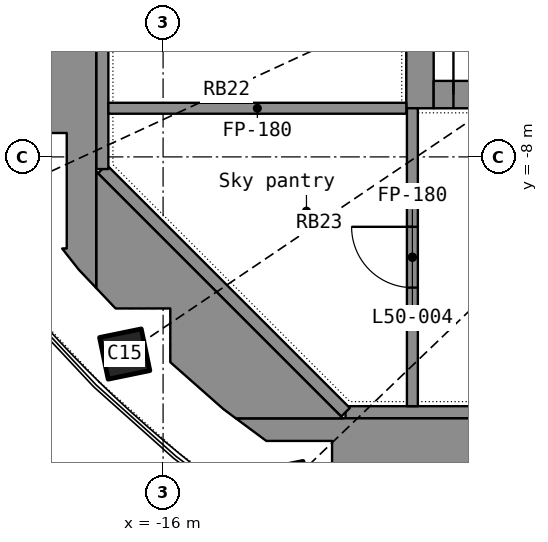
"""IFC4 building model, lengths in metres.
Left out: names, types, materials, properties, quantities, classifications, styles, units other than length and angle.
Written with IfcOpenShell. Run it as: python <this file> out.ifc"""

import sys

from ifc_helpers import new_model, si_unit, direction, frame, frame_2d, origin, origin_2d, place, context, subcontext, project, spatial, polyline, rectangle, hollow_rectangle, outline, extrude, element, fill, save


model = new_model("IFC4")
c1 = context("Model", 3, precision=1e-05, world=origin(), true_north=direction((0.0, 1.0)))
c2 = subcontext(c1, "Body", "Model", "MODEL_VIEW")
j1 = project(units=[si_unit("LENGTHUNIT", "METRE"), si_unit("PLANEANGLEUNIT", "RADIAN")], contexts=[c1])
p1 = place(None, origin())
s1 = spatial("IfcSite", under=j1, at=p1, CompositionType="ELEMENT")
p2 = place(p1, origin())
s2 = spatial("IfcBuilding", under=s1, at=p2, CompositionType="ELEMENT")
p3 = place(p2, frame((0.0, 0.0, 205.2)))
s3 = spatial("IfcBuildingStorey", under=s2, at=p3, CompositionType="ELEMENT", Elevation=205.2)
p4 = place(p3, frame((-18.535, -8.557, 0.0), z_axis=(0.029972624, 0.014178469, 0.999450155), x_axis=(-0.583640912, 0.811989828, 0.005983767)))
e1 = element("IfcColumn", 1, at=p4, inside=s3, PredefinedType="COLUMN", context=c2, shape_type="SweptSolid", body=[
    extrude(hollow_rectangle(XDim=1.1, YDim=1.1, WallThickness=0.032, at=origin_2d()), origin(), (0.0, 0.0, 1.0), 7.404),
])
p5 = place(p3, frame((-16.631, -11.243, 0.0), z_axis=(0.026511305, 0.018201791, 0.999482789), x_axis=(-0.720516136, 0.693407857, 0.006483911)))
e2 = element("IfcColumn", 2, at=p5, inside=s3, PredefinedType="COLUMN", context=c2, shape_type="SweptSolid", body=[
    extrude(hollow_rectangle(XDim=0.7, YDim=0.7, WallThickness=0.025, at=origin_2d()), origin(), (0.0, 0.0, 1.0), 7.404),
])
p6 = place(p3, frame((-13.971, -13.421, 0.0), z_axis=(0.022258382, 0.021697801, 0.999516768), x_axis=(-0.828160065, 0.560456529, 0.006275862)))
e3 = element("IfcColumn", 3, at=p6, inside=s3, PredefinedType="COLUMN", context=c2, shape_type="SweptSolid", body=[
    extrude(hollow_rectangle(XDim=0.7, YDim=0.7, WallThickness=0.025, at=origin_2d()), origin(), (0.0, 0.0, 1.0), 7.404),
])
p7 = place(p3, frame((13.0, -12.2, 0.08), z_axis=(0.0, 0.0, 1.0), x_axis=(-1.0, 0.0, 0.0)))
e4 = element("IfcWall", 4, at=p7, inside=s3, PredefinedType="STANDARD", context=c2, shape_type="SweptSolid", body=[
    extrude(rectangle(XDim=26.0, YDim=0.2, at=frame_2d((13.0, 0.0))), origin(), (0.0, 0.0, 1.0), 7.12),
])
p8 = place(p7, frame((7.1, 0.0, 0.0)))
e5 = element("IfcOpeningElement", 5, at=p8, cuts=e4, PredefinedType="OPENING", context=c2, shape_type="SweptSolid", body=[
    extrude(rectangle(XDim=1.8, YDim=2.4, at=frame_2d((0.9, 1.2))), frame((0.0, 0.11, 0.0), z_axis=(0.0, -1.0, 0.0), x_axis=(1.0, 0.0, 0.0)), (0.0, 0.0, 1.0), 0.22),
])
p9 = place(p7, frame((17.1, 0.0, 0.0)))
e6 = element("IfcOpeningElement", 6, at=p9, cuts=e4, PredefinedType="OPENING", context=c2, shape_type="SweptSolid", body=[
    extrude(rectangle(XDim=1.8, YDim=2.4, at=frame_2d((0.9, 1.2))), frame((0.0, 0.11, 0.0), z_axis=(0.0, -1.0, 0.0), x_axis=(1.0, 0.0, 0.0)), (0.0, 0.0, 1.0), 0.22),
])
p10 = place(p7, frame((3.3, 0.0, 0.9)))
e7 = element("IfcOpeningElement", 7, at=p10, cuts=e4, PredefinedType="OPENING", context=c2, shape_type="SweptSolid", body=[
    extrude(rectangle(XDim=2.4, YDim=1.5, at=frame_2d((1.2, 0.75))), frame((0.0, 0.11, 0.0), z_axis=(0.0, -1.0, 0.0), x_axis=(1.0, 0.0, 0.0)), (0.0, 0.0, 1.0), 0.22),
])
p11 = place(p7, frame((11.8, 0.0, 0.9)))
e8 = element("IfcOpeningElement", 8, at=p11, cuts=e4, PredefinedType="OPENING", context=c2, shape_type="SweptSolid", body=[
    extrude(rectangle(XDim=2.4, YDim=1.5, at=frame_2d((1.2, 0.75))), frame((0.0, 0.11, 0.0), z_axis=(0.0, -1.0, 0.0), x_axis=(1.0, 0.0, 0.0)), (0.0, 0.0, 1.0), 0.22),
])
p12 = place(p7, frame((20.3, 0.0, 0.9)))
e9 = element("IfcOpeningElement", 9, at=p12, cuts=e4, PredefinedType="OPENING", context=c2, shape_type="SweptSolid", body=[
    extrude(rectangle(XDim=2.4, YDim=1.5, at=frame_2d((1.2, 0.75))), frame((0.0, 0.11, 0.0), z_axis=(0.0, -1.0, 0.0), x_axis=(1.0, 0.0, 0.0)), (0.0, 0.0, 1.0), 0.22),
])
p13 = place(p7, frame((6.5, 0.0, 3.2)))
e10 = element("IfcOpeningElement", 10, at=p13, cuts=e4, PredefinedType="OPENING", context=c2, shape_type="SweptSolid", body=[
    extrude(rectangle(XDim=3.0, YDim=1.0, at=frame_2d((1.5, 0.5))), frame((0.0, 0.11, 0.0), z_axis=(0.0, -1.0, 0.0), x_axis=(1.0, 0.0, 0.0)), (0.0, 0.0, 1.0), 0.22),
])
p14 = place(p7, frame((16.5, 0.0, 3.2)))
e11 = element("IfcOpeningElement", 11, at=p14, cuts=e4, PredefinedType="OPENING", context=c2, shape_type="SweptSolid", body=[
    extrude(rectangle(XDim=3.0, YDim=1.0, at=frame_2d((1.5, 0.5))), frame((0.0, 0.11, 0.0), z_axis=(0.0, -1.0, 0.0), x_axis=(1.0, 0.0, 0.0)), (0.0, 0.0, 1.0), 0.22),
])
p15 = place(p3, frame((-13.0, -12.2, 0.08), z_axis=(0.0, 0.0, 1.0), x_axis=(-0.707106781, 0.707106781, 0.0)))
e12 = element("IfcWall", 12, at=p15, inside=s3, PredefinedType="STANDARD", context=c2, shape_type="SweptSolid", body=[
    extrude(rectangle(XDim=5.657, YDim=0.2, at=frame_2d((2.828, 0.0))), origin(), (0.0, 0.0, 1.0), 7.12),
])
p16 = place(p3, frame((-17.0, -8.2, 0.08), z_axis=(0.0, 0.0, 1.0), x_axis=(0.0, 1.0, 0.0)))
e13 = element("IfcWall", 13, at=p16, inside=s3, PredefinedType="STANDARD", context=c2, shape_type="SweptSolid", body=[
    extrude(rectangle(XDim=16.4, YDim=0.2, at=frame_2d((8.2, 0.0))), origin(), (0.0, 0.0, 1.0), 7.12),
])
p17 = place(p16, frame((7.3, 0.0, 0.0)))
e14 = element("IfcOpeningElement", 14, at=p17, cuts=e13, PredefinedType="OPENING", context=c2, shape_type="SweptSolid", body=[
    extrude(rectangle(XDim=1.8, YDim=2.4, at=frame_2d((0.9, 1.2))), frame((0.0, 0.11, 0.0), z_axis=(0.0, -1.0, 0.0), x_axis=(1.0, 0.0, 0.0)), (0.0, 0.0, 1.0), 0.22),
])
p18 = place(p16, frame((3.4, 0.0, 0.1)))
e15 = element("IfcOpeningElement", 15, at=p18, cuts=e13, PredefinedType="OPENING", context=c2, shape_type="SweptSolid", body=[
    extrude(rectangle(XDim=1.2, YDim=2.2, at=frame_2d((0.6, 1.1))), frame((0.0, 0.11, 0.0), z_axis=(0.0, -1.0, 0.0), x_axis=(1.0, 0.0, 0.0)), (0.0, 0.0, 1.0), 0.22),
])
p19 = place(p16, frame((11.8, 0.0, 0.1)))
e16 = element("IfcOpeningElement", 16, at=p19, cuts=e13, PredefinedType="OPENING", context=c2, shape_type="SweptSolid", body=[
    extrude(rectangle(XDim=1.2, YDim=2.2, at=frame_2d((0.6, 1.1))), frame((0.0, 0.11, 0.0), z_axis=(0.0, -1.0, 0.0), x_axis=(1.0, 0.0, 0.0)), (0.0, 0.0, 1.0), 0.22),
])
p20 = place(p3, frame((0.0, 0.0, -0.4)))
e17 = element("IfcWall", 17, at=p20, inside=s3, PredefinedType="ELEMENTEDWALL", context=c2, shape_type="SweptSolid", body=[
    extrude(outline(polyline([(-8.97, -15.569), (-8.196, -15.829), (-8.196, -15.756), (-6.696, -15.756), (-6.696, -16.286), (-5.9, -16.49), (-5.9, -12.3), (-13.042, -12.3), (-14.803, -12.3), (-14.302, -12.671), (-13.221, -12.671), (-13.221, -13.422), (-12.175, -14.072), (-11.7, -14.317), (-11.7, -13.974), (-9.8, -13.974), (-9.8, -15.22), (-8.97, -15.569)])), origin(), (0.0, 0.0, 1.0), 1.58),
])
p21 = place(p3, frame((0.0, 0.0, -0.4)))
e18 = element("IfcWall", 18, at=p21, inside=s3, PredefinedType="ELEMENTEDWALL", context=c2, shape_type="SweptSolid", body=[
    extrude(outline(polyline([(-14.803, -12.3), (-13.042, -12.3), (-17.1, -8.241), (-17.1, -10.156), (-16.781, -10.493), (-15.881, -10.493), (-15.881, -11.377), (-15.009, -12.147), (-14.803, -12.3)])), origin(), (0.0, 0.0, 1.0), 1.58),
])
p22 = place(p3, frame((0.0, 0.0, -0.4)))
e19 = element("IfcWall", 19, at=p22, inside=s3, PredefinedType="ELEMENTEDWALL", context=c2, shape_type="SweptSolid", body=[
    extrude(outline(polyline([(-17.1, -10.156), (-17.1, -8.241), (-17.1, -0.9), (-20.39, -0.9), (-20.39, -0.95), (-21.175, -0.95), (-21.145, -1.497), (-21.019, -2.273), (-20.567, -2.273), (-20.567, -3.773), (-20.687, -3.773), (-20.503, -4.446), (-20.205, -5.212), (-19.606, -5.212), (-19.606, -6.54), (-19.237, -7.26), (-19.014, -7.607), (-17.585, -7.607), (-17.585, -9.507), (-17.66, -9.507), (-17.387, -9.853), (-17.1, -10.156)])), origin(), (0.0, 0.0, 1.0), 1.58),
])
p23 = place(p3, frame((-11.775, -7.2, 0.0), z_axis=(0.0, 0.0, 1.0), x_axis=(0.0, 1.0, 0.0)))
e20 = element("IfcWall", 20, at=p23, inside=s3, PredefinedType="SHEAR", context=c2, shape_type="SweptSolid", body=[
    extrude(rectangle(XDim=14.4, YDim=0.45, at=frame_2d((7.2, 0.0))), origin(), (0.0, 0.0, 1.0), 7.0),
])
p24 = place(p23, frame((6.5, 0.0, 0.0)))
e21 = element("IfcOpeningElement", 21, at=p24, cuts=e20, PredefinedType="OPENING", context=c2, shape_type="SweptSolid", body=[
    extrude(rectangle(XDim=1.4, YDim=2.2, at=frame_2d((0.7, 1.1))), frame((0.0, 0.235, 0.0), z_axis=(0.0, -1.0, 0.0), x_axis=(1.0, 0.0, 0.0)), (0.0, 0.0, 1.0), 0.47),
])
p25 = place(p3, frame((-11.55, -6.975, 0.0), z_axis=(0.0, 0.0, 1.0), x_axis=(1.0, 0.0, 0.0)))
e22 = element("IfcWall", 22, at=p25, inside=s3, PredefinedType="SHEAR", context=c2, shape_type="SweptSolid", body=[
    extrude(rectangle(XDim=23.1, YDim=0.45, at=frame_2d((11.55, 0.0))), origin(), (0.0, 0.0, 1.0), 7.0),
])
p26 = place(p25, frame((20.0, 0.0, 0.0)))
e23 = element("IfcOpeningElement", 23, at=p26, cuts=e22, PredefinedType="OPENING", context=c2, shape_type="SweptSolid", body=[
    extrude(rectangle(XDim=1.1, YDim=2.2, at=frame_2d((0.55, 1.1))), frame((0.0, 0.235, 0.0), z_axis=(0.0, -1.0, 0.0), x_axis=(1.0, 0.0, 0.0)), (0.0, 0.0, 1.0), 0.47),
])
p27 = place(p25, frame((5.1, 0.0, 0.0)))
e24 = element("IfcOpeningElement", 24, at=p27, cuts=e22, PredefinedType="OPENING", context=c2, shape_type="SweptSolid", body=[
    extrude(rectangle(XDim=0.9, YDim=2.1, at=frame_2d((0.45, 1.05))), frame((0.0, 0.235, 0.0), z_axis=(0.0, -1.0, 0.0), x_axis=(1.0, 0.0, 0.0)), (0.0, 0.0, 1.0), 0.47),
])
p28 = place(p25, frame((12.1, 0.0, 0.0)))
e25 = element("IfcOpeningElement", 25, at=p28, cuts=e22, PredefinedType="OPENING", context=c2, shape_type="SweptSolid", body=[
    extrude(rectangle(XDim=0.9, YDim=2.1, at=frame_2d((0.45, 1.05))), frame((0.0, 0.235, 0.0), z_axis=(0.0, -1.0, 0.0), x_axis=(1.0, 0.0, 0.0)), (0.0, 0.0, 1.0), 0.47),
])
p29 = place(p25, frame((17.1, 0.0, 0.0)))
e26 = element("IfcOpeningElement", 26, at=p29, cuts=e22, PredefinedType="OPENING", context=c2, shape_type="SweptSolid", body=[
    extrude(rectangle(XDim=0.9, YDim=2.1, at=frame_2d((0.45, 1.05))), frame((0.0, 0.235, 0.0), z_axis=(0.0, -1.0, 0.0), x_axis=(1.0, 0.0, 0.0)), (0.0, 0.0, 1.0), 0.47),
])
p30 = place(p25, frame((0.325, 0.0, 0.0)))
e27 = element("IfcOpeningElement", 27, at=p30, cuts=e22, PredefinedType="OPENING", context=c2, shape_type="SweptSolid", body=[
    extrude(rectangle(XDim=0.8, YDim=2.05, at=frame_2d((0.4, 1.025))), frame((0.0, 0.235, 0.0), z_axis=(0.0, -1.0, 0.0), x_axis=(1.0, 0.0, 0.0)), (0.0, 0.0, 1.0), 0.47),
])
p31 = place(p25, frame((21.975, 0.0, 0.0)))
e28 = element("IfcOpeningElement", 28, at=p31, cuts=e22, PredefinedType="OPENING", context=c2, shape_type="SweptSolid", body=[
    extrude(rectangle(XDim=0.8, YDim=2.05, at=frame_2d((0.4, 1.025))), frame((0.0, 0.235, 0.0), z_axis=(0.0, -1.0, 0.0), x_axis=(1.0, 0.0, 0.0)), (0.0, 0.0, 1.0), 0.47),
])
p32 = place(p3, frame((-11.9, -12.1, 0.0), z_axis=(0.0, 0.0, 1.0), x_axis=(0.0, 1.0, 0.0)))
e29 = element("IfcWall", 29, at=p32, inside=s3, PredefinedType="PARTITIONING", context=c2, shape_type="SweptSolid", body=[
    extrude(rectangle(XDim=4.9, YDim=0.18, at=frame_2d((2.45, 0.0))), origin(), (0.0, 0.0, 1.0), 6.1),
])
p33 = place(p32, frame((1.95, 0.0, 0.0)))
e30 = element("IfcOpeningElement", 30, at=p33, cuts=e29, PredefinedType="OPENING", context=c2, shape_type="SweptSolid", body=[
    extrude(rectangle(XDim=1.0, YDim=2.1, at=frame_2d((0.5, 1.05))), frame((0.0, 0.1, 0.0), z_axis=(0.0, -1.0, 0.0), x_axis=(1.0, 0.0, 0.0)), (0.0, 0.0, 1.0), 0.2),
])
p34 = place(p3, frame((-12.0, -7.2, 0.0), z_axis=(0.0, 0.0, 1.0), x_axis=(-1.0, 0.0, 0.0)))
e31 = element("IfcWall", 31, at=p34, inside=s3, PredefinedType="PARTITIONING", context=c2, shape_type="SweptSolid", body=[
    extrude(rectangle(XDim=4.9, YDim=0.18, at=frame_2d((2.45, 0.0))), origin(), (0.0, 0.0, 1.0), 6.1),
])
p35 = place(p30, origin())
e32 = element("IfcDoor", 32, at=p35, inside=s3, OperationType="SINGLE_SWING_LEFT", PredefinedType="DOOR", context=c2, shape_type="SweptSolid", body=[
    extrude(rectangle(XDim=0.8, YDim=2.05, at=frame_2d((0.4, 1.025))), frame((0.0, 0.025, 0.0), z_axis=(0.0, -1.0, 0.0), x_axis=(1.0, 0.0, 0.0)), (0.0, 0.0, 1.0), 0.05),
])
fill(e27, e32)
p36 = place(p33, origin())
e33 = element("IfcDoor", 33, at=p36, inside=s3, OperationType="SINGLE_SWING_RIGHT", PredefinedType="DOOR", context=c2, shape_type="SweptSolid", body=[
    extrude(rectangle(XDim=1.0, YDim=2.1, at=frame_2d((0.5, 1.05))), frame((0.0, 0.025, 0.0), z_axis=(0.0, -1.0, 0.0), x_axis=(1.0, 0.0, 0.0)), (0.0, 0.0, 1.0), 0.05),
])
fill(e30, e33)
save(model, sys.argv[1])
